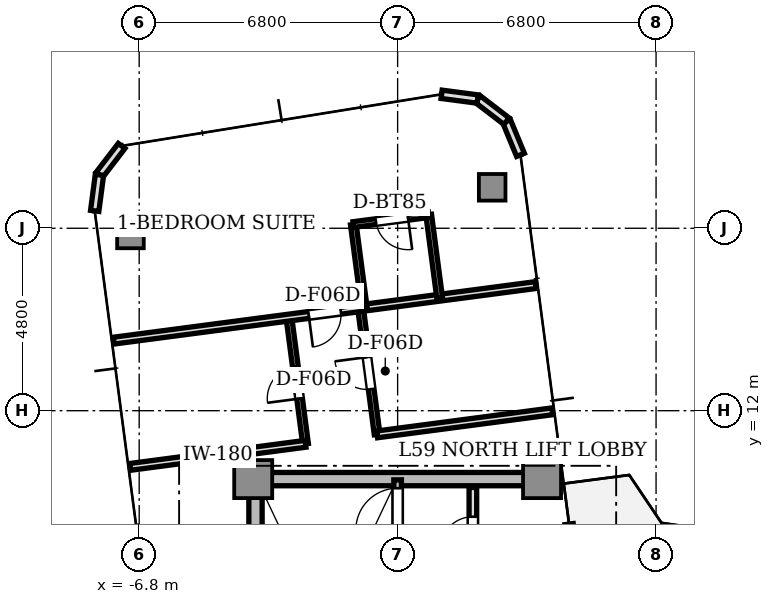
"""IFC4 building model, lengths in metres.
Left out: names, types, materials, properties, quantities, classifications, styles, units other than length and angle.
Written with IfcOpenShell. Run it as: python <this file> out.ifc"""

import sys

from ifc_helpers import new_model, si_unit, direction, frame, frame_2d, origin, origin_2d, place, context, subcontext, project, spatial, rectangle, extrude, source, transform, mapped, element, fill, save


model = new_model("IFC4")
c1 = context("Model", 3, precision=1e-05, world=origin(), true_north=direction((0.0, 1.0)))
c2 = subcontext(c1, "Body", "Model", "MODEL_VIEW")
j1 = project(units=[si_unit("LENGTHUNIT", "METRE"), si_unit("PLANEANGLEUNIT", "RADIAN")], contexts=[c1])
p1 = place(None, origin())
s1 = spatial("IfcSite", under=j1, at=p1, CompositionType="ELEMENT")
p2 = place(p1, origin())
s2 = spatial("IfcBuilding", under=s1, at=p2, CompositionType="ELEMENT")
p3 = place(p2, frame((0.0, 0.0, 213.2)))
s3 = spatial("IfcBuildingStorey", under=s2, at=p3, CompositionType="ELEMENT", Elevation=213.2)
p4 = place(p3, frame((-3.55, 10.2, 0.0), z_axis=(0.0, 0.0, 1.0), x_axis=(1.0, 0.0, 0.0)))
e1 = element("IfcWall", 1, at=p4, inside=s3, PredefinedType="SHEAR", context=c2, shape_type="SweptSolid", body=[
    extrude(rectangle(XDim=7.1, YDim=0.35, at=frame_2d((3.55, 0.0))), origin(), (0.0, 0.0, 1.0), 3.11),
])
p5 = place(p3, frame((-3.74, 2.85, 0.0), z_axis=(0.0, 0.0, 1.0), x_axis=(0.0, 1.0, 0.0)))
e2 = element("IfcWall", 2, at=p5, inside=s3, PredefinedType="SHEAR", context=c2, shape_type="SweptSolid", body=[
    extrude(rectangle(XDim=6.9, YDim=0.35, at=frame_2d((3.45, 0.0))), origin(), (0.0, 0.0, 1.0), 3.11),
])
m1 = source(origin(), c2, "Body", "SweptSolid", [
    extrude(rectangle(XDim=1.0, YDim=1.0, at=origin_2d()), origin(), (0.0, 0.0, 1.0), 3.11),
])
for number, where, z_axis, x_axis in (
    (3, (-3.8, 10.2, 0.0), (0.0, 0.0, 1.0), (1.0, 0.0, 0.0)),
    (4, (3.8, 10.2, 0.0), (0.0, 0.0, 1.0), (1.0, 0.0, 0.0)),
):
    element("IfcColumn", number, at=place(p3, frame(where, z_axis=z_axis, x_axis=x_axis)), inside=s3, PredefinedType="COLUMN", context=c2, shape_type="MappedRepresentation", body=[
        mapped(m1, transform((0.0, 0.0, 0.0), scale=1.0)),
    ])
m2 = source(origin(), c2, "Body", "SweptSolid", [
    extrude(rectangle(XDim=0.7, YDim=0.7, at=origin_2d()), origin(), (0.0, 0.0, 1.0), 3.11),
])
for number, where, z_axis, x_axis in (
    (5, (2.488, 17.878, 0.0), (0.0, 0.0, 1.0), (1.0, 0.0, 0.0)),
    (6, (-7.03, 16.625, 0.0), (0.0, 0.0, 1.0), (1.0, 0.0, 0.0)),
):
    element("IfcColumn", number, at=place(p3, frame(where, z_axis=z_axis, x_axis=x_axis)), inside=s3, PredefinedType="COLUMN", context=c2, shape_type="MappedRepresentation", body=[
        mapped(m2, transform((0.0, 0.0, 0.0), scale=1.0)),
    ])
p6 = place(p3, frame((4.864, 6.339, 0.0), z_axis=(0.0, 0.0, 1.0), x_axis=(-0.130564442062, 0.991439824936, 0.0)))
e7 = element("IfcWall", 7, at=p6, inside=s3, PredefinedType="STANDARD", context=c2, shape_type="SweptSolid", body=[
    extrude(rectangle(XDim=2.7, YDim=0.22, at=frame_2d((1.35, 0.0))), origin(), (0.0, 0.0, 1.0), 3.11),
])
p7 = place(p6, frame((1.4, 0.0, 0.0)))
e8 = element("IfcOpeningElement", 8, at=p7, cuts=e7, PredefinedType="OPENING", context=c2, shape_type="SweptSolid", body=[
    extrude(rectangle(XDim=1.0, YDim=2.2, at=frame_2d((0.5, 1.1))), frame((0.0, 0.12, 0.0), z_axis=(0.0, -1.0, 0.0), x_axis=(1.0, 0.0, 0.0)), (0.0, 0.0, 1.0), 0.24),
])
for number, where, z_axis, x_axis in (
    (9, (3.233, 18.732, 0.0), (0.0, 0.0, 1.0), (-0.383, 0.924, 0.0)),
    (10, (2.866, 19.617, 0.0), (0.0, 0.0, 1.0), (-0.793, 0.609, 0.0)),
    (11, (2.106, 20.2, 0.0), (0.0, 0.0, 1.0), (-0.991, 0.131, 0.0)),
):
    element("IfcWall", number, at=place(p3, frame(where, z_axis=z_axis, x_axis=x_axis)), inside=s3, PredefinedType="STANDARD", context=c2, shape_type="SweptSolid", body=[
        extrude(rectangle(XDim=0.958, YDim=0.22, at=frame_2d((0.479, 0.0))), origin(), (0.0, 0.0, 1.0), 3.11),
    ])
p8 = place(p3, frame((-7.263, 18.966, 0.0), z_axis=(0.0, 0.0, 1.0), x_axis=(-0.608897151398, -0.793249178392, 0.0)))
e12 = element("IfcWall", 12, at=p8, inside=s3, PredefinedType="STANDARD", context=c2, shape_type="SweptSolid", body=[
    extrude(rectangle(XDim=0.958, YDim=0.22, at=frame_2d((0.479, 0.0))), origin(), (0.0, 0.0, 1.0), 3.11),
])
p9 = place(p3, frame((-7.846, 18.207, 0.0), z_axis=(0.0, 0.0, 1.0), x_axis=(-0.130527053476, -0.991444747987, 0.0)))
e13 = element("IfcWall", 13, at=p9, inside=s3, PredefinedType="STANDARD", context=c2, shape_type="SweptSolid", body=[
    extrude(rectangle(XDim=0.958, YDim=0.22, at=frame_2d((0.479, 0.0))), origin(), (0.0, 0.0, 1.0), 3.11),
])
p10 = place(p3, frame((0.0, 2.5, 0.0), z_axis=(0.0, 0.0, 1.0), x_axis=(0.0, 1.0, 0.0)))
e14 = element("IfcWall", 14, at=p10, inside=s3, PredefinedType="SOLIDWALL", context=c2, shape_type="SweptSolid", body=[
    extrude(rectangle(XDim=7.68, YDim=0.2, at=frame_2d((3.84, 0.0))), origin(), (0.0, 0.0, 1.0), 3.11),
])
p11 = place(p10, frame((6.36, 0.0, 0.0)))
e15 = element("IfcOpeningElement", 15, at=p11, cuts=e14, PredefinedType="OPENING", context=c2, shape_type="SweptSolid", body=[
    extrude(rectangle(XDim=1.1, YDim=2.15, at=frame_2d((0.55, 1.075))), frame((0.0, 0.11, 0.0), z_axis=(0.0, -1.0, 0.0), x_axis=(1.0, 0.0, 0.0)), (0.0, 0.0, 1.0), 0.22),
])
p12 = place(p3, frame((1.98, 5.32, 0.0), z_axis=(0.0, 0.0, 1.0), x_axis=(0.0, 1.0, 0.0)))
e16 = element("IfcWall", 16, at=p12, inside=s3, PredefinedType="SOLIDWALL", context=c2, shape_type="SweptSolid", body=[
    extrude(rectangle(XDim=4.66, YDim=0.2, at=frame_2d((2.33, 0.0))), origin(), (0.0, 0.0, 1.0), 2.66),
])
p13 = place(p12, frame((3.04, 0.0, 0.0)))
e17 = element("IfcOpeningElement", 17, at=p13, cuts=e16, PredefinedType="OPENING", context=c2, shape_type="SweptSolid", body=[
    extrude(rectangle(XDim=0.85, YDim=2.1, at=frame_2d((0.425, 1.05))), frame((0.0, 0.11, 0.0), z_axis=(0.0, -1.0, 0.0), x_axis=(1.0, 0.0, 0.0)), (0.0, 0.0, 1.0), 0.22),
])
p14 = place(p3, frame((-2.423, 11.129, 0.0), z_axis=(0.0, 0.0, 1.0), x_axis=(-0.130526150873, 0.991444866817, 0.0)))
e18 = element("IfcWall", 18, at=p14, inside=s3, PredefinedType="PARTITIONING", context=c2, shape_type="SweptSolid", body=[
    extrude(rectangle(XDim=3.35, YDim=0.15, at=frame_2d((1.675, 0.0))), origin(), (0.0, 0.0, 1.0), 2.66),
])
p15 = place(p14, frame((1.2, 0.0, 0.0)))
e19 = element("IfcOpeningElement", 19, at=p15, cuts=e18, PredefinedType="OPENING", context=c2, shape_type="SweptSolid", body=[
    extrude(rectangle(XDim=0.85, YDim=2.1, at=frame_2d((0.425, 1.05))), frame((0.0, 0.085, 0.0), z_axis=(0.0, -1.0, 0.0), x_axis=(1.0, 0.0, 0.0)), (0.0, 0.0, 1.0), 0.17),
])
p16 = place(p3, frame((-0.54, 11.377, 0.0), z_axis=(0.0, 0.0, 1.0), x_axis=(-0.130526150873, 0.991444866817, 0.0)))
e20 = element("IfcWall", 20, at=p16, inside=s3, PredefinedType="PARTITIONING", context=c2, shape_type="SweptSolid", body=[
    extrude(rectangle(XDim=3.35, YDim=0.15, at=frame_2d((1.675, 0.0))), origin(), (0.0, 0.0, 1.0), 2.66),
])
p17 = place(p16, frame((1.2, 0.0, 0.0)))
e21 = element("IfcOpeningElement", 21, at=p17, cuts=e20, PredefinedType="OPENING", context=c2, shape_type="SweptSolid", body=[
    extrude(rectangle(XDim=0.85, YDim=2.1, at=frame_2d((0.425, 1.05))), frame((0.0, 0.085, 0.0), z_axis=(0.0, -1.0, 0.0), x_axis=(1.0, 0.0, 0.0)), (0.0, 0.0, 1.0), 0.17),
])
p18 = place(p3, frame((-2.423, 11.129, 0.0), z_axis=(0.0, 0.0, 1.0), x_axis=(-0.991445715827, -0.13051970184, 0.0)))
e22 = element("IfcWall", 22, at=p18, inside=s3, PredefinedType="PARTITIONING", context=c2, shape_type="SweptSolid", body=[
    extrude(rectangle(XDim=4.65, YDim=0.18, at=frame_2d((2.325, 0.0))), origin(), (0.0, 0.0, 1.0), 2.66),
])
p19 = place(p3, frame((4.071, 11.984, 0.0), z_axis=(0.0, 0.0, 1.0), x_axis=(-0.991444821367, -0.130526496103, 0.0)))
e23 = element("IfcWall", 23, at=p19, inside=s3, PredefinedType="PARTITIONING", context=c2, shape_type="SweptSolid", body=[
    extrude(rectangle(XDim=4.65, YDim=0.18, at=frame_2d((2.325, 0.0))), origin(), (0.0, 0.0, 1.0), 2.66),
])
p20 = place(p3, frame((3.633, 15.305, 0.0), z_axis=(0.0, 0.0, 1.0), x_axis=(-0.991444350479, -0.130530072791, 0.0)))
e24 = element("IfcWall", 24, at=p20, inside=s3, PredefinedType="PARTITIONING", context=c2, shape_type="SweptSolid", body=[
    extrude(rectangle(XDim=11.2, YDim=0.18, at=frame_2d((5.6, 0.0))), origin(), (0.0, 0.0, 1.0), 2.66),
])
p21 = place(p20, frame((5.175, 0.0, 0.0)))
e25 = element("IfcOpeningElement", 25, at=p21, cuts=e24, PredefinedType="OPENING", context=c2, shape_type="SweptSolid", body=[
    extrude(rectangle(XDim=0.85, YDim=2.1, at=frame_2d((0.425, 1.05))), frame((0.0, 0.1, 0.0), z_axis=(0.0, -1.0, 0.0), x_axis=(1.0, 0.0, 0.0)), (0.0, 0.0, 1.0), 0.2),
])
p22 = place(p3, frame((-0.878, 14.711, 0.0), z_axis=(0.0, 0.0, 1.0), x_axis=(-0.13053183865, 0.991444117991, 0.0)))
e26 = element("IfcWall", 26, at=p22, inside=s3, PredefinedType="PARTITIONING", context=c2, shape_type="SweptSolid", body=[
    extrude(rectangle(XDim=2.205, YDim=0.15, at=frame_2d((1.103, 0.0))), origin(), (0.0, 0.0, 1.0), 2.66),
])
p23 = place(p3, frame((1.105, 14.972, 0.0), z_axis=(0.0, 0.0, 1.0), x_axis=(-0.130546168268, 0.991442231272, 0.0)))
e27 = element("IfcWall", 27, at=p23, inside=s3, PredefinedType="PARTITIONING", context=c2, shape_type="SweptSolid", body=[
    extrude(rectangle(XDim=2.205, YDim=0.15, at=frame_2d((1.103, 0.0))), origin(), (0.0, 0.0, 1.0), 2.66),
])
p24 = place(p3, frame((0.817, 17.158, 0.0), z_axis=(0.0, 0.0, 1.0), x_axis=(-0.991449308994, -0.130492404742, 0.0)))
e28 = element("IfcWall", 28, at=p24, inside=s3, PredefinedType="PARTITIONING", context=c2, shape_type="SweptSolid", body=[
    extrude(rectangle(XDim=2.0, YDim=0.15, at=frame_2d((1.0, 0.0))), origin(), (0.0, 0.0, 1.0), 2.66),
])
p25 = place(p24, frame((0.55, 0.0, 0.0)))
e29 = element("IfcOpeningElement", 29, at=p25, cuts=e28, PredefinedType="OPENING", context=c2, shape_type="SweptSolid", body=[
    extrude(rectangle(XDim=0.85, YDim=2.1, at=frame_2d((0.425, 1.05))), frame((0.0, 0.085, 0.0), z_axis=(0.0, -1.0, 0.0), x_axis=(1.0, 0.0, 0.0)), (0.0, 0.0, 1.0), 0.17),
])
m3 = source(origin(), c2, "Body", "SweptSolid", [
    extrude(rectangle(XDim=1.1, YDim=0.05, at=origin_2d()), origin(), (0.0, 0.0, 1.0), 2.15),
])
p26 = place(p11, frame((0.55, 0.0, 0.0)))
e30 = element("IfcDoor", 30, at=p26, inside=s3, OperationType="SINGLE_SWING_LEFT", PredefinedType="DOOR", context=c2, shape_type="MappedRepresentation", body=[
    mapped(m3, transform((0.0, 0.0, 0.0), scale=1.0)),
])
fill(e15, e30)
m4 = source(origin(), c2, "Body", "SweptSolid", [
    extrude(rectangle(XDim=0.85, YDim=0.05, at=origin_2d()), origin(), (0.0, 0.0, 1.0), 2.1),
])
p27 = place(p13, frame((0.425, 0.0, 0.0)))
e31 = element("IfcDoor", 31, at=p27, inside=s3, OperationType="SINGLE_SWING_LEFT", PredefinedType="DOOR", context=c2, shape_type="MappedRepresentation", body=[
    mapped(m4, transform((0.0, 0.0, 0.0), scale=1.0)),
])
fill(e17, e31)
p28 = place(p15, frame((0.425, 0.0, 0.0)))
e32 = element("IfcDoor", 32, at=p28, inside=s3, OperationType="SINGLE_SWING_LEFT", PredefinedType="DOOR", context=c2, shape_type="MappedRepresentation", body=[
    mapped(m4, transform((0.0, 0.0, 0.0), scale=1.0)),
])
fill(e19, e32)
p29 = place(p17, frame((0.425, 0.0, 0.0)))
e33 = element("IfcDoor", 33, at=p29, inside=s3, OperationType="SINGLE_SWING_RIGHT", PredefinedType="DOOR", context=c2, shape_type="MappedRepresentation", body=[
    mapped(m4, transform((0.0, 0.0, 0.0), scale=1.0)),
])
fill(e21, e33)
p30 = place(p25, frame((0.425, 0.0, 0.0)))
e34 = element("IfcDoor", 34, at=p30, inside=s3, OperationType="SINGLE_SWING_LEFT", PredefinedType="DOOR", context=c2, shape_type="MappedRepresentation", body=[
    mapped(m4, transform((0.0, 0.0, 0.0), scale=1.0)),
])
fill(e29, e34)
p31 = place(p21, frame((0.425, 0.0, 0.0)))
e35 = element("IfcDoor", 35, at=p31, inside=s3, OperationType="SINGLE_SWING_RIGHT", PredefinedType="DOOR", context=c2, shape_type="MappedRepresentation", body=[
    mapped(m4, transform((0.0, 0.0, 0.0), scale=1.0)),
])
fill(e25, e35)
save(model, sys.argv[1])
